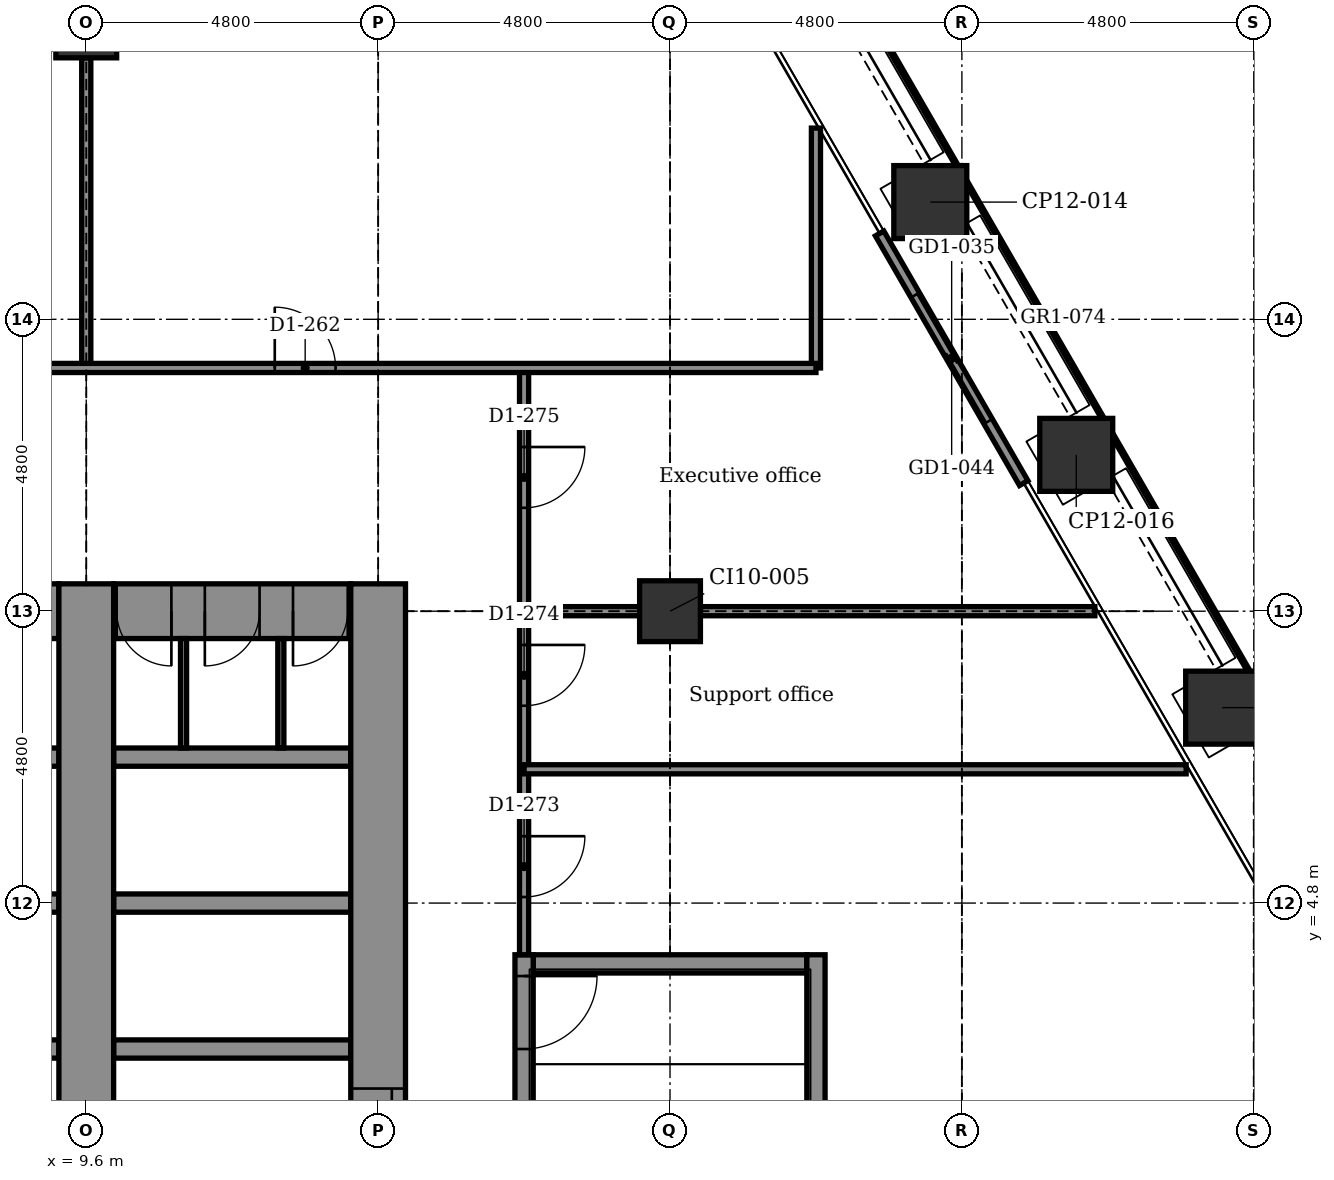
"""IFC4 building model, lengths in metres.
Left out: names, types, materials, properties, quantities, classifications, styles, units other than length and angle.
Written with IfcOpenShell. Run it as: python <this file> out.ifc"""

import sys

from ifc_helpers import new_model, si_unit, direction, frame, frame_2d, origin, origin_2d, place, context, subcontext, project, spatial, rectangle, extrude, element, fill, save


model = new_model("IFC4")
c1 = context("Model", 3, precision=1e-05, world=origin(), true_north=direction((0.0, 1.0)))
c2 = subcontext(c1, "Body", "Model", "MODEL_VIEW")
j1 = project(units=[si_unit("LENGTHUNIT", "METRE"), si_unit("PLANEANGLEUNIT", "RADIAN")], contexts=[c1])
p1 = place(None, origin())
s1 = spatial("IfcSite", under=j1, at=p1, CompositionType="ELEMENT")
p2 = place(p1, origin())
s2 = spatial("IfcBuilding", under=s1, at=p2, CompositionType="ELEMENT")
p3 = place(p2, frame((0.0, 0.0, 95.9)))
s3 = spatial("IfcBuildingStorey", under=s2, at=p3, CompositionType="ELEMENT", Elevation=95.9)
for number, where, z_axis, x_axis in (
    (1, (23.48, 16.328, -0.2), (0.0, 0.0, 1.0), (0.866, 0.5, 0.0)),
    (2, (25.88, 12.171, -0.2), (0.0, 0.0, 1.0), (0.866, 0.5, 0.0)),
    (3, (28.28, 8.014, -0.2), (0.0, 0.0, 1.0), (0.866, 0.5, 0.0)),
):
    element("IfcColumn", number, at=place(p3, frame(where, z_axis=z_axis, x_axis=x_axis)), inside=s3, PredefinedType="COLUMN", context=c2, shape_type="SweptSolid", body=[
        extrude(rectangle(XDim=1.2, YDim=1.2, at=origin_2d()), origin(), (0.0, 0.0, 1.0), 4.5),
    ])
for number, where, z_axis, x_axis in (
    (4, (9.6, 19.2, -0.2), (0.0, 0.0, 1.0), (1.0, 0.0, 0.0)),
    (5, (19.2, 9.6, -0.2), (0.0, 0.0, 1.0), (1.0, 0.0, 0.0)),
):
    element("IfcColumn", number, at=place(p3, frame(where, z_axis=z_axis, x_axis=x_axis)), inside=s3, PredefinedType="COLUMN", context=c2, shape_type="SweptSolid", body=[
        extrude(rectangle(XDim=1.0, YDim=1.0, at=origin_2d()), origin(), (0.0, 0.0, 1.0), 4.5),
    ])
p4 = place(p3, frame((6.15, 2.4, -0.2), z_axis=(0.0, 0.0, 1.0), x_axis=(1.0, 0.0, 0.0)))
e6 = element("IfcWall", 6, at=p4, inside=s3, PredefinedType="STANDARD", context=c2, shape_type="SweptSolid", body=[
    extrude(rectangle(XDim=3.0, YDim=0.3, at=frame_2d((1.5, 0.0))), origin(), (0.0, 0.0, 1.0), 4.5),
])
p5 = place(p3, frame((10.05, 2.4, -0.2), z_axis=(0.0, 0.0, 1.0), x_axis=(1.0, 0.0, 0.0)))
e7 = element("IfcWall", 7, at=p5, inside=s3, PredefinedType="STANDARD", context=c2, shape_type="SweptSolid", body=[
    extrude(rectangle(XDim=3.9, YDim=0.3, at=frame_2d((1.95, 0.0))), origin(), (0.0, 0.0, 1.0), 4.5),
])
p6 = place(p3, frame((16.95, 3.8, -0.2), z_axis=(0.0, 0.0, 1.0), x_axis=(1.0, 0.0, 0.0)))
e8 = element("IfcWall", 8, at=p6, inside=s3, PredefinedType="STANDARD", context=c2, shape_type="SweptSolid", body=[
    extrude(rectangle(XDim=4.5, YDim=0.3, at=frame_2d((2.25, 0.0))), origin(), (0.0, 0.0, 1.0), 4.5),
])
p7 = place(p3, frame((6.15, 4.8, -0.2), z_axis=(0.0, 0.0, 1.0), x_axis=(1.0, 0.0, 0.0)))
e9 = element("IfcWall", 9, at=p7, inside=s3, PredefinedType="STANDARD", context=c2, shape_type="SweptSolid", body=[
    extrude(rectangle(XDim=3.0, YDim=0.3, at=frame_2d((1.5, 0.0))), origin(), (0.0, 0.0, 1.0), 4.5),
])
p8 = place(p3, frame((10.05, 4.8, -0.2), z_axis=(0.0, 0.0, 1.0), x_axis=(1.0, 0.0, 0.0)))
e10 = element("IfcWall", 10, at=p8, inside=s3, PredefinedType="STANDARD", context=c2, shape_type="SweptSolid", body=[
    extrude(rectangle(XDim=3.9, YDim=0.3, at=frame_2d((1.95, 0.0))), origin(), (0.0, 0.0, 1.0), 4.5),
])
p9 = place(p3, frame((6.0, 7.2, -0.2), z_axis=(0.0, 0.0, 1.0), x_axis=(1.0, 0.0, 0.0)))
e11 = element("IfcWall", 11, at=p9, inside=s3, PredefinedType="STANDARD", context=c2, shape_type="SweptSolid", body=[
    extrude(rectangle(XDim=3.15, YDim=0.3, at=frame_2d((1.575, 0.0))), origin(), (0.0, 0.0, 1.0), 4.5),
])
p10 = place(p3, frame((10.05, 7.2, -0.2), z_axis=(0.0, 0.0, 1.0), x_axis=(1.0, 0.0, 0.0)))
e12 = element("IfcWall", 12, at=p10, inside=s3, PredefinedType="STANDARD", context=c2, shape_type="SweptSolid", body=[
    extrude(rectangle(XDim=3.9, YDim=0.3, at=frame_2d((1.95, 0.0))), origin(), (0.0, 0.0, 1.0), 4.5),
])
p11 = place(p3, frame((-5.25, 9.6, -0.2), z_axis=(0.0, 0.0, 1.0), x_axis=(1.0, 0.0, 0.0)))
e13 = element("IfcWall", 13, at=p11, inside=s3, PredefinedType="SHEAR", context=c2, shape_type="SweptSolid", body=[
    extrude(rectangle(XDim=14.4, YDim=0.9, at=frame_2d((7.2, 0.0))), origin(), (0.0, 0.0, 1.0), 4.5),
])
p12 = place(p11, frame((0.6, 0.0, 0.2)))
e14 = element("IfcOpeningElement", 14, at=p12, cuts=e13, PredefinedType="OPENING", context=c2, shape_type="SweptSolid", body=[
    extrude(rectangle(XDim=0.9, YDim=2.1, at=frame_2d((0.45, 1.05))), frame((0.0, 0.46, 0.0), z_axis=(0.0, -1.0, 0.0), x_axis=(1.0, 0.0, 0.0)), (0.0, 0.0, 1.0), 0.92),
])
p13 = place(p3, frame((10.05, 9.6, -0.2), z_axis=(0.0, 0.0, 1.0), x_axis=(1.0, 0.0, 0.0)))
e15 = element("IfcWall", 15, at=p13, inside=s3, PredefinedType="SHEAR", context=c2, shape_type="SweptSolid", body=[
    extrude(rectangle(XDim=3.9, YDim=0.9, at=frame_2d((1.95, 0.0))), origin(), (0.0, 0.0, 1.0), 4.5),
])
p14 = place(p13, frame((0.05, 0.0, 0.2)))
e16 = element("IfcOpeningElement", 16, at=p14, cuts=e15, PredefinedType="OPENING", context=c2, shape_type="SweptSolid", body=[
    extrude(rectangle(XDim=0.9, YDim=2.1, at=frame_2d((0.45, 1.05))), frame((0.0, 0.46, 0.0), z_axis=(0.0, -1.0, 0.0), x_axis=(1.0, 0.0, 0.0)), (0.0, 0.0, 1.0), 0.92),
])
p15 = place(p13, frame((1.5, 0.0, 0.2)))
e17 = element("IfcOpeningElement", 17, at=p15, cuts=e15, PredefinedType="OPENING", context=c2, shape_type="SweptSolid", body=[
    extrude(rectangle(XDim=0.9, YDim=2.1, at=frame_2d((0.45, 1.05))), frame((0.0, 0.46, 0.0), z_axis=(0.0, -1.0, 0.0), x_axis=(1.0, 0.0, 0.0)), (0.0, 0.0, 1.0), 0.92),
])
p16 = place(p13, frame((2.95, 0.0, 0.2)))
e18 = element("IfcOpeningElement", 18, at=p16, cuts=e15, PredefinedType="OPENING", context=c2, shape_type="SweptSolid", body=[
    extrude(rectangle(XDim=0.9, YDim=2.1, at=frame_2d((0.45, 1.05))), frame((0.0, 0.46, 0.0), z_axis=(0.0, -1.0, 0.0), x_axis=(1.0, 0.0, 0.0)), (0.0, 0.0, 1.0), 0.92),
])
p17 = place(p3, frame((9.6, -10.15, -0.2), z_axis=(0.0, 0.0, 1.0), x_axis=(0.0, 1.0, 0.0)))
e19 = element("IfcWall", 19, at=p17, inside=s3, PredefinedType="SHEAR", context=c2, shape_type="SweptSolid", body=[
    extrude(rectangle(XDim=20.2, YDim=0.9, at=frame_2d((10.1, 0.0))), origin(), (0.0, 0.0, 1.0), 4.5),
])
p18 = place(p3, frame((14.4, -10.05, -0.2), z_axis=(0.0, 0.0, 1.0), x_axis=(0.0, 1.0, 0.0)))
e20 = element("IfcWall", 20, at=p18, inside=s3, PredefinedType="SHEAR", context=c2, shape_type="SweptSolid", body=[
    extrude(rectangle(XDim=20.1, YDim=0.9, at=frame_2d((10.05, 0.0))), origin(), (0.0, 0.0, 1.0), 4.5),
])
p19 = place(p18, frame((3.5, 0.0, 0.2)))
e21 = element("IfcOpeningElement", 21, at=p19, cuts=e20, PredefinedType="OPENING", context=c2, shape_type="SweptSolid", body=[
    extrude(rectangle(XDim=1.1, YDim=2.1, at=frame_2d((0.55, 1.05))), frame((0.0, 0.46, 0.0), z_axis=(0.0, -1.0, 0.0), x_axis=(1.0, 0.0, 0.0)), (0.0, 0.0, 1.0), 0.92),
])
p20 = place(p18, frame((5.9, 0.0, 0.2)))
e22 = element("IfcOpeningElement", 22, at=p20, cuts=e20, PredefinedType="OPENING", context=c2, shape_type="SweptSolid", body=[
    extrude(rectangle(XDim=1.1, YDim=2.1, at=frame_2d((0.55, 1.05))), frame((0.0, 0.46, 0.0), z_axis=(0.0, -1.0, 0.0), x_axis=(1.0, 0.0, 0.0)), (0.0, 0.0, 1.0), 0.92),
])
p21 = place(p18, frame((8.3, 0.0, 0.2)))
e23 = element("IfcOpeningElement", 23, at=p21, cuts=e20, PredefinedType="OPENING", context=c2, shape_type="SweptSolid", body=[
    extrude(rectangle(XDim=1.1, YDim=2.1, at=frame_2d((0.55, 1.05))), frame((0.0, 0.46, 0.0), z_axis=(0.0, -1.0, 0.0), x_axis=(1.0, 0.0, 0.0)), (0.0, 0.0, 1.0), 0.92),
])
p22 = place(p18, frame((10.7, 0.0, 0.2)))
e24 = element("IfcOpeningElement", 24, at=p22, cuts=e20, PredefinedType="OPENING", context=c2, shape_type="SweptSolid", body=[
    extrude(rectangle(XDim=1.1, YDim=2.1, at=frame_2d((0.55, 1.05))), frame((0.0, 0.46, 0.0), z_axis=(0.0, -1.0, 0.0), x_axis=(1.0, 0.0, 0.0)), (0.0, 0.0, 1.0), 0.92),
])
p23 = place(p3, frame((16.8, -3.95, -0.2), z_axis=(0.0, 0.0, 1.0), x_axis=(0.0, 1.0, 0.0)))
e25 = element("IfcWall", 25, at=p23, inside=s3, PredefinedType="STANDARD", context=c2, shape_type="SweptSolid", body=[
    extrude(rectangle(XDim=7.9, YDim=0.3, at=frame_2d((3.95, 0.0))), origin(), (0.0, 0.0, 1.0), 4.5),
])
p24 = place(p23, frame((6.35, 0.0, 0.2)))
e26 = element("IfcOpeningElement", 26, at=p24, cuts=e25, PredefinedType="OPENING", context=c2, shape_type="SweptSolid", body=[
    extrude(rectangle(XDim=1.2, YDim=2.1, at=frame_2d((0.6, 1.05))), frame((0.0, 0.16, 0.0), z_axis=(0.0, -1.0, 0.0), x_axis=(1.0, 0.0, 0.0)), (0.0, 0.0, 1.0), 0.32),
])
p25 = place(p3, frame((21.6, -3.95, -0.2), z_axis=(0.0, 0.0, 1.0), x_axis=(0.0, 1.0, 0.0)))
e27 = element("IfcWall", 27, at=p25, inside=s3, PredefinedType="STANDARD", context=c2, shape_type="SweptSolid", body=[
    extrude(rectangle(XDim=7.9, YDim=0.3, at=frame_2d((3.95, 0.0))), origin(), (0.0, 0.0, 1.0), 4.5),
])
p26 = place(p3, frame((22.647, 15.812, 0.0), z_axis=(0.0, 0.0, 1.0), x_axis=(0.499978080042, -0.866038058908, 0.0)))
e28 = element("IfcWall", 28, at=p26, inside=s3, PredefinedType="PARTITIONING", context=c2, shape_type="SweptSolid", body=[
    extrude(rectangle(XDim=4.74, YDim=0.16, at=frame_2d((2.37, 0.0))), origin(), (0.0, 0.0, 1.0), 4.3),
])
p27 = place(p26, frame((1.17, 0.0, 0.0)))
e29 = element("IfcOpeningElement", 29, at=p27, cuts=e28, PredefinedType="OPENING", context=c2, shape_type="SweptSolid", body=[
    extrude(rectangle(XDim=2.4, YDim=2.4, at=frame_2d((1.2, 1.2))), frame((0.0, 0.09, 0.0), z_axis=(0.0, -1.0, 0.0), x_axis=(1.0, 0.0, 0.0)), (0.0, 0.0, 1.0), 0.18),
])
p28 = place(p3, frame((21.6, 13.6, 0.0), z_axis=(0.0, 0.0, 1.0), x_axis=(0.0, 1.0, 0.0)))
e30 = element("IfcWall", 30, at=p28, inside=s3, PredefinedType="PARTITIONING", context=c2, shape_type="SweptSolid", body=[
    extrude(rectangle(XDim=3.945, YDim=0.15, at=frame_2d((1.972, 0.0))), origin(), (0.0, 0.0, 1.0), 4.3),
])
p29 = place(p3, frame((16.8, 3.95, 0.0), z_axis=(0.0, 0.0, 1.0), x_axis=(0.0, 1.0, 0.0)))
e31 = element("IfcWall", 31, at=p29, inside=s3, PredefinedType="PARTITIONING", context=c2, shape_type="SweptSolid", body=[
    extrude(rectangle(XDim=9.65, YDim=0.15, at=frame_2d((4.825, 0.0))), origin(), (0.0, 0.0, 1.0), 4.3),
])
p30 = place(p29, frame((0.95, 0.0, 0.0)))
e32 = element("IfcOpeningElement", 32, at=p30, cuts=e31, PredefinedType="OPENING", context=c2, shape_type="SweptSolid", body=[
    extrude(rectangle(XDim=1.0, YDim=2.1, at=frame_2d((0.5, 1.05))), frame((0.0, 0.085, 0.0), z_axis=(0.0, -1.0, 0.0), x_axis=(1.0, 0.0, 0.0)), (0.0, 0.0, 1.0), 0.17),
])
p31 = place(p29, frame((4.095, 0.0, 0.0)))
e33 = element("IfcOpeningElement", 33, at=p31, cuts=e31, PredefinedType="OPENING", context=c2, shape_type="SweptSolid", body=[
    extrude(rectangle(XDim=1.0, YDim=2.1, at=frame_2d((0.5, 1.05))), frame((0.0, 0.085, 0.0), z_axis=(0.0, -1.0, 0.0), x_axis=(1.0, 0.0, 0.0)), (0.0, 0.0, 1.0), 0.17),
])
p32 = place(p29, frame((7.35, 0.0, 0.0)))
e34 = element("IfcOpeningElement", 34, at=p32, cuts=e31, PredefinedType="OPENING", context=c2, shape_type="SweptSolid", body=[
    extrude(rectangle(XDim=1.0, YDim=2.1, at=frame_2d((0.5, 1.05))), frame((0.0, 0.085, 0.0), z_axis=(0.0, -1.0, 0.0), x_axis=(1.0, 0.0, 0.0)), (0.0, 0.0, 1.0), 0.17),
])
for number, where, z_axis, x_axis in (
    (35, (12.8, 7.35, 0.0), (0.0, 0.0, 1.0), (0.0, 1.0, 0.0)),
    (36, (11.2, 7.35, 0.0), (0.0, 0.0, 1.0), (0.0, 1.0, 0.0)),
):
    element("IfcWall", number, at=place(p3, frame(where, z_axis=z_axis, x_axis=x_axis)), inside=s3, PredefinedType="PARTITIONING", context=c2, shape_type="SweptSolid", body=[
        extrude(rectangle(XDim=1.8, YDim=0.1, at=frame_2d((0.9, 0.0))), origin(), (0.0, 0.0, 1.0), 4.3),
    ])
p33 = place(p3, frame((9.6, 13.6, 0.0), z_axis=(0.0, 0.0, 1.0), x_axis=(0.0, 1.0, 0.0)))
e37 = element("IfcWall", 37, at=p33, inside=s3, PredefinedType="PARTITIONING", context=c2, shape_type="SweptSolid", body=[
    extrude(rectangle(XDim=5.1, YDim=0.15, at=frame_2d((2.55, 0.0))), origin(), (0.0, 0.0, 1.0), 3.843),
])
p34 = place(p3, frame((16.8, 7.0, 0.0), z_axis=(0.0, 0.0, 1.0), x_axis=(1.0, 0.0, 0.0)))
e38 = element("IfcWall", 38, at=p34, inside=s3, PredefinedType="PARTITIONING", context=c2, shape_type="SweptSolid", body=[
    extrude(rectangle(XDim=10.888, YDim=0.15, at=frame_2d((5.444, 0.0))), origin(), (0.0, 0.0, 1.0), 4.3),
])
p35 = place(p3, frame((16.8, 9.6, 0.0), z_axis=(0.0, 0.0, 1.0), x_axis=(1.0, 0.0, 0.0)))
e39 = element("IfcWall", 39, at=p35, inside=s3, PredefinedType="PARTITIONING", context=c2, shape_type="SweptSolid", body=[
    extrude(rectangle(XDim=1.9, YDim=0.15, at=frame_2d((0.95, 0.0))), origin(), (0.0, 0.0, 1.0), 3.692),
])
p36 = place(p3, frame((19.7, 9.6, 0.0), z_axis=(0.0, 0.0, 1.0), x_axis=(1.0, 0.0, 0.0)))
e40 = element("IfcWall", 40, at=p36, inside=s3, PredefinedType="PARTITIONING", context=c2, shape_type="SweptSolid", body=[
    extrude(rectangle(XDim=6.487, YDim=0.15, at=frame_2d((3.243, 0.0))), origin(), (0.0, 0.0, 1.0), 3.692),
])
p37 = place(p3, frame((-16.8, 13.6, 0.0), z_axis=(0.0, 0.0, 1.0), x_axis=(1.0, 0.0, 0.0)))
e41 = element("IfcWall", 41, at=p37, inside=s3, PredefinedType="PARTITIONING", context=c2, shape_type="SweptSolid", body=[
    extrude(rectangle(XDim=38.4, YDim=0.15, at=frame_2d((19.2, 0.0))), origin(), (0.0, 0.0, 1.0), 4.3),
])
p38 = place(p37, frame((2.915, 0.0, 0.0)))
e42 = element("IfcOpeningElement", 42, at=p38, cuts=e41, PredefinedType="OPENING", context=c2, shape_type="SweptSolid", body=[
    extrude(rectangle(XDim=1.0, YDim=2.1, at=frame_2d((0.5, 1.05))), frame((0.0, 0.085, 0.0), z_axis=(0.0, -1.0, 0.0), x_axis=(1.0, 0.0, 0.0)), (0.0, 0.0, 1.0), 0.17),
])
p39 = place(p37, frame((5.5, 0.0, 0.0)))
e43 = element("IfcOpeningElement", 43, at=p39, cuts=e41, PredefinedType="OPENING", context=c2, shape_type="SweptSolid", body=[
    extrude(rectangle(XDim=1.0, YDim=2.1, at=frame_2d((0.5, 1.05))), frame((0.0, 0.085, 0.0), z_axis=(0.0, -1.0, 0.0), x_axis=(1.0, 0.0, 0.0)), (0.0, 0.0, 1.0), 0.17),
])
p40 = place(p37, frame((10.3, 0.0, 0.0)))
e44 = element("IfcOpeningElement", 44, at=p40, cuts=e41, PredefinedType="OPENING", context=c2, shape_type="SweptSolid", body=[
    extrude(rectangle(XDim=1.0, YDim=2.1, at=frame_2d((0.5, 1.05))), frame((0.0, 0.085, 0.0), z_axis=(0.0, -1.0, 0.0), x_axis=(1.0, 0.0, 0.0)), (0.0, 0.0, 1.0), 0.17),
])
p41 = place(p37, frame((14.925, 0.0, 0.0)))
e45 = element("IfcOpeningElement", 45, at=p41, cuts=e41, PredefinedType="OPENING", context=c2, shape_type="SweptSolid", body=[
    extrude(rectangle(XDim=1.0, YDim=2.1, at=frame_2d((0.5, 1.05))), frame((0.0, 0.085, 0.0), z_axis=(0.0, -1.0, 0.0), x_axis=(1.0, 0.0, 0.0)), (0.0, 0.0, 1.0), 0.17),
])
p42 = place(p37, frame((17.975, 0.0, 0.0)))
e46 = element("IfcOpeningElement", 46, at=p42, cuts=e41, PredefinedType="OPENING", context=c2, shape_type="SweptSolid", body=[
    extrude(rectangle(XDim=1.0, YDim=2.1, at=frame_2d((0.5, 1.05))), frame((0.0, 0.085, 0.0), z_axis=(0.0, -1.0, 0.0), x_axis=(1.0, 0.0, 0.0)), (0.0, 0.0, 1.0), 0.17),
])
p43 = place(p37, frame((23.5, 0.0, 0.0)))
e47 = element("IfcOpeningElement", 47, at=p43, cuts=e41, PredefinedType="OPENING", context=c2, shape_type="SweptSolid", body=[
    extrude(rectangle(XDim=1.0, YDim=2.1, at=frame_2d((0.5, 1.05))), frame((0.0, 0.085, 0.0), z_axis=(0.0, -1.0, 0.0), x_axis=(1.0, 0.0, 0.0)), (0.0, 0.0, 1.0), 0.17),
])
p44 = place(p37, frame((29.5, 0.0, 0.0)))
e48 = element("IfcOpeningElement", 48, at=p44, cuts=e41, PredefinedType="OPENING", context=c2, shape_type="SweptSolid", body=[
    extrude(rectangle(XDim=1.0, YDim=2.1, at=frame_2d((0.5, 1.05))), frame((0.0, 0.085, 0.0), z_axis=(0.0, -1.0, 0.0), x_axis=(1.0, 0.0, 0.0)), (0.0, 0.0, 1.0), 0.17),
])
p45 = place(p27, origin())
e49 = element("IfcDoor", 49, at=p45, inside=s3, OperationType="DOUBLE_DOOR_SLIDING", PredefinedType="DOOR", context=c2, shape_type="SweptSolid", body=[
    extrude(rectangle(XDim=2.4, YDim=2.4, at=frame_2d((1.2, 1.2))), frame((0.0, 0.025, 0.0), z_axis=(0.0, -1.0, 0.0), x_axis=(1.0, 0.0, 0.0)), (0.0, 0.0, 1.0), 0.05),
])
fill(e29, e49)
p46 = place(p44, origin())
e50 = element("IfcDoor", 50, at=p46, inside=s3, OperationType="SINGLE_SWING_LEFT", PredefinedType="DOOR", context=c2, shape_type="SweptSolid", body=[
    extrude(rectangle(XDim=1.0, YDim=2.1, at=frame_2d((0.5, 1.05))), frame((0.0, 0.025, 0.0), z_axis=(0.0, -1.0, 0.0), x_axis=(1.0, 0.0, 0.0)), (0.0, 0.0, 1.0), 0.05),
])
fill(e48, e50)
p47 = place(p30, frame((1.0, 0.0, 0.0), z_axis=(0.0, 0.0, 1.0), x_axis=(-1.0, 0.0, 0.0)))
e51 = element("IfcDoor", 51, at=p47, inside=s3, OperationType="SINGLE_SWING_RIGHT", PredefinedType="DOOR", context=c2, shape_type="SweptSolid", body=[
    extrude(rectangle(XDim=1.0, YDim=2.1, at=frame_2d((0.5, 1.05))), frame((0.0, 0.025, 0.0), z_axis=(0.0, -1.0, 0.0), x_axis=(1.0, 0.0, 0.0)), (0.0, 0.0, 1.0), 0.05),
])
fill(e32, e51)
p48 = place(p31, frame((1.0, 0.0, 0.0), z_axis=(0.0, 0.0, 1.0), x_axis=(-1.0, 0.0, 0.0)))
e52 = element("IfcDoor", 52, at=p48, inside=s3, OperationType="SINGLE_SWING_RIGHT", PredefinedType="DOOR", context=c2, shape_type="SweptSolid", body=[
    extrude(rectangle(XDim=1.0, YDim=2.1, at=frame_2d((0.5, 1.05))), frame((0.0, 0.025, 0.0), z_axis=(0.0, -1.0, 0.0), x_axis=(1.0, 0.0, 0.0)), (0.0, 0.0, 1.0), 0.05),
])
fill(e33, e52)
p49 = place(p32, frame((1.0, 0.0, 0.0), z_axis=(0.0, 0.0, 1.0), x_axis=(-1.0, 0.0, 0.0)))
e53 = element("IfcDoor", 53, at=p49, inside=s3, OperationType="SINGLE_SWING_RIGHT", PredefinedType="DOOR", context=c2, shape_type="SweptSolid", body=[
    extrude(rectangle(XDim=1.0, YDim=2.1, at=frame_2d((0.5, 1.05))), frame((0.0, 0.025, 0.0), z_axis=(0.0, -1.0, 0.0), x_axis=(1.0, 0.0, 0.0)), (0.0, 0.0, 1.0), 0.05),
])
fill(e34, e53)
p50 = place(p22, origin())
e54 = element("IfcDoor", 54, at=p50, inside=s3, OperationType="DOUBLE_DOOR_SLIDING", PredefinedType="DOOR", context=c2, shape_type="SweptSolid", body=[
    extrude(rectangle(XDim=1.1, YDim=2.1, at=frame_2d((0.55, 1.05))), frame((0.0, 0.025, 0.0), z_axis=(0.0, -1.0, 0.0), x_axis=(1.0, 0.0, 0.0)), (0.0, 0.0, 1.0), 0.05),
])
fill(e24, e54)
p51 = place(p24, frame((1.2, 0.0, 0.0), z_axis=(0.0, 0.0, 1.0), x_axis=(-1.0, 0.0, 0.0)))
e55 = element("IfcDoor", 55, at=p51, inside=s3, OperationType="SINGLE_SWING_RIGHT", PredefinedType="DOOR", context=c2, shape_type="SweptSolid", body=[
    extrude(rectangle(XDim=1.2, YDim=2.1, at=frame_2d((0.6, 1.05))), frame((0.0, 0.025, 0.0), z_axis=(0.0, -1.0, 0.0), x_axis=(1.0, 0.0, 0.0)), (0.0, 0.0, 1.0), 0.05),
])
fill(e26, e55)
p52 = place(p14, frame((0.9, 0.0, 0.0), z_axis=(0.0, 0.0, 1.0), x_axis=(-1.0, 0.0, 0.0)))
e56 = element("IfcDoor", 56, at=p52, inside=s3, OperationType="SINGLE_SWING_RIGHT", PredefinedType="DOOR", context=c2, shape_type="SweptSolid", body=[
    extrude(rectangle(XDim=0.9, YDim=2.1, at=frame_2d((0.45, 1.05))), frame((0.0, 0.025, 0.0), z_axis=(0.0, -1.0, 0.0), x_axis=(1.0, 0.0, 0.0)), (0.0, 0.0, 1.0), 0.05),
])
fill(e16, e56)
p53 = place(p15, frame((0.9, 0.0, 0.0), z_axis=(0.0, 0.0, 1.0), x_axis=(-1.0, 0.0, 0.0)))
e57 = element("IfcDoor", 57, at=p53, inside=s3, OperationType="SINGLE_SWING_LEFT", PredefinedType="DOOR", context=c2, shape_type="SweptSolid", body=[
    extrude(rectangle(XDim=0.9, YDim=2.1, at=frame_2d((0.45, 1.05))), frame((0.0, 0.025, 0.0), z_axis=(0.0, -1.0, 0.0), x_axis=(1.0, 0.0, 0.0)), (0.0, 0.0, 1.0), 0.05),
])
fill(e17, e57)
p54 = place(p16, frame((0.9, 0.0, 0.0), z_axis=(0.0, 0.0, 1.0), x_axis=(-1.0, 0.0, 0.0)))
e58 = element("IfcDoor", 58, at=p54, inside=s3, OperationType="SINGLE_SWING_LEFT", PredefinedType="DOOR", context=c2, shape_type="SweptSolid", body=[
    extrude(rectangle(XDim=0.9, YDim=2.1, at=frame_2d((0.45, 1.05))), frame((0.0, 0.025, 0.0), z_axis=(0.0, -1.0, 0.0), x_axis=(1.0, 0.0, 0.0)), (0.0, 0.0, 1.0), 0.05),
])
fill(e18, e58)
save(model, sys.argv[1])
